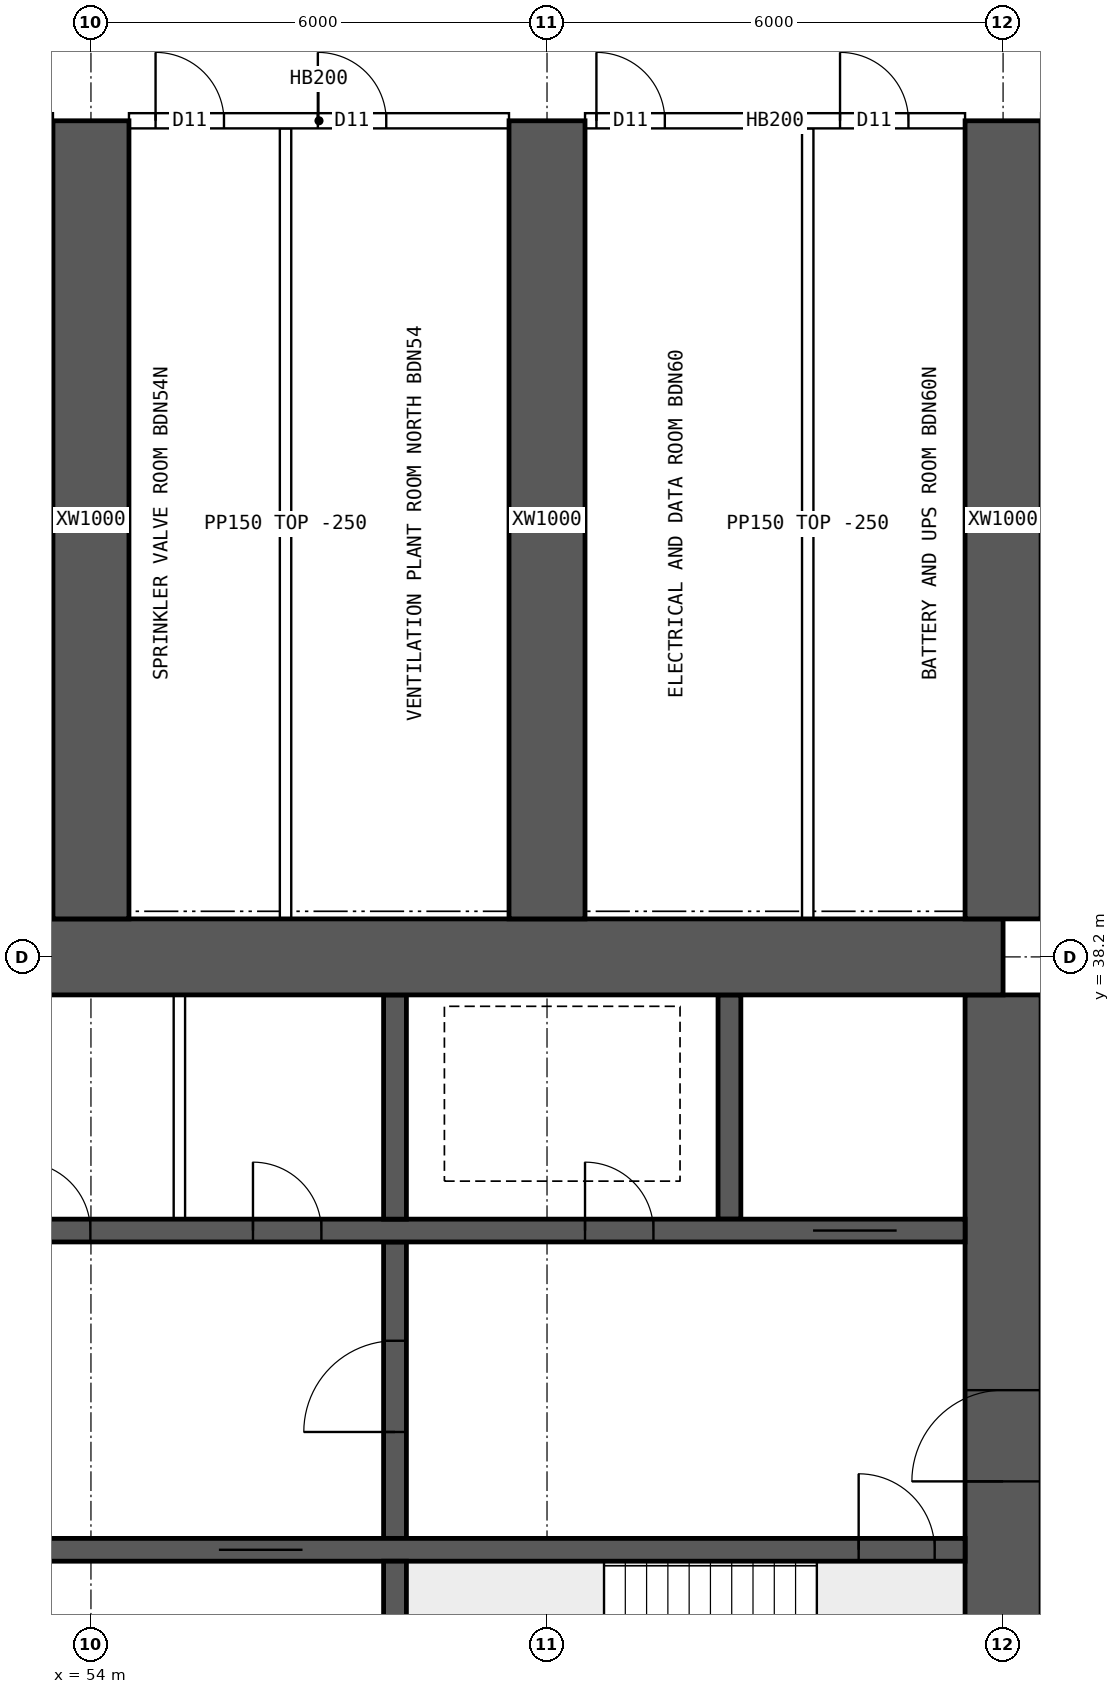
"""IFC4 building model, lengths in metres.
Left out: names, types, materials, properties, quantities, classifications, styles, units other than length and angle.
Written with IfcOpenShell. Run it as: python <this file> out.ifc"""

import sys

from ifc_helpers import new_model, si_unit, direction, frame, frame_2d, origin, place, context, subcontext, project, spatial, rectangle, extrude, element, fill, save


model = new_model("IFC4")
c1 = context("Model", 3, precision=1e-05, world=origin(), true_north=direction((0.0, 1.0)))
c2 = subcontext(c1, "Body", "Model", "MODEL_VIEW")
j1 = project(units=[si_unit("LENGTHUNIT", "METRE"), si_unit("PLANEANGLEUNIT", "RADIAN")], contexts=[c1])
p1 = place(None, origin())
s1 = spatial("IfcSite", under=j1, at=p1, CompositionType="ELEMENT")
p2 = place(p1, origin())
s2 = spatial("IfcBuilding", under=s1, at=p2, CompositionType="ELEMENT")
p3 = place(p2, frame((0.0, 0.0, 27.7)))
s3 = spatial("IfcBuildingStorey", under=s2, at=p3, CompositionType="ELEMENT", Elevation=27.7)
p4 = place(p3, frame((18.0, 38.2, 0.0), z_axis=(0.0, 0.0, 1.0), x_axis=(1.0, 0.0, 0.0)))
e1 = element("IfcWall", 1, at=p4, inside=s3, PredefinedType="SHEAR", context=c2, shape_type="SweptSolid", body=[
    extrude(rectangle(XDim=48.0, YDim=1.0, at=frame_2d((24.0, 0.0))), origin(), (0.0, 0.0, 1.0), 3.75),
])
p5 = place(p3, frame((66.0, 26.3, 0.0), z_axis=(0.0, 0.0, 1.0), x_axis=(0.0, 1.0, 0.0)))
e2 = element("IfcWall", 2, at=p5, inside=s3, PredefinedType="SHEAR", context=c2, shape_type="SweptSolid", body=[
    extrude(rectangle(XDim=11.4, YDim=1.0, at=frame_2d((5.7, 0.0))), origin(), (0.0, 0.0, 1.0), 3.75),
])
p6 = place(p5, frame((5.0, 0.0, 0.0)))
e3 = element("IfcOpeningElement", 3, at=p6, cuts=e2, PredefinedType="OPENING", context=c2, shape_type="SweptSolid", body=[
    extrude(rectangle(XDim=1.2, YDim=2.1, at=frame_2d((0.6, 1.05))), frame((0.0, 0.51, 0.0), z_axis=(0.0, -1.0, 0.0), x_axis=(1.0, 0.0, 0.0)), (0.0, 0.0, 1.0), 1.02),
])
p7 = place(p3, frame((18.5, 30.4, 0.0), z_axis=(0.0, 0.0, 1.0), x_axis=(1.0, 0.0, 0.0)))
e4 = element("IfcWall", 4, at=p7, inside=s3, PredefinedType="SHEAR", context=c2, shape_type="SweptSolid", body=[
    extrude(rectangle(XDim=47.0, YDim=0.3, at=frame_2d((23.5, 0.0))), origin(), (0.0, 0.0, 1.0), 3.75),
])
p8 = place(p7, frame((0.4, 0.0, 0.0)))
e5 = element("IfcOpeningElement", 5, at=p8, cuts=e4, PredefinedType="OPENING", context=c2, shape_type="SweptSolid", body=[
    extrude(rectangle(XDim=1.0, YDim=2.1, at=frame_2d((0.5, 1.05))), frame((0.0, 0.16, 0.0), z_axis=(0.0, -1.0, 0.0), x_axis=(1.0, 0.0, 0.0)), (0.0, 0.0, 1.0), 0.32),
])
p9 = place(p7, frame((45.6, 0.0, 0.0)))
e6 = element("IfcOpeningElement", 6, at=p9, cuts=e4, PredefinedType="OPENING", context=c2, shape_type="SweptSolid", body=[
    extrude(rectangle(XDim=1.0, YDim=2.1, at=frame_2d((0.5, 1.05))), frame((0.0, 0.16, 0.0), z_axis=(0.0, -1.0, 0.0), x_axis=(1.0, 0.0, 0.0)), (0.0, 0.0, 1.0), 0.32),
])
p10 = place(p7, frame((8.25, 0.0, 0.0)))
e7 = element("IfcOpeningElement", 7, at=p10, cuts=e4, PredefinedType="OPENING", context=c2, shape_type="SweptSolid", body=[
    extrude(rectangle(XDim=1.1, YDim=2.1, at=frame_2d((0.55, 1.05))), frame((0.0, 0.16, 0.0), z_axis=(0.0, -1.0, 0.0), x_axis=(1.0, 0.0, 0.0)), (0.0, 0.0, 1.0), 0.32),
])
p11 = place(p7, frame((10.85, 0.0, 0.0)))
e8 = element("IfcOpeningElement", 8, at=p11, cuts=e4, PredefinedType="OPENING", context=c2, shape_type="SweptSolid", body=[
    extrude(rectangle(XDim=1.1, YDim=2.1, at=frame_2d((0.55, 1.05))), frame((0.0, 0.16, 0.0), z_axis=(0.0, -1.0, 0.0), x_axis=(1.0, 0.0, 0.0)), (0.0, 0.0, 1.0), 0.32),
])
p12 = place(p7, frame((13.45, 0.0, 0.0)))
e9 = element("IfcOpeningElement", 9, at=p12, cuts=e4, PredefinedType="OPENING", context=c2, shape_type="SweptSolid", body=[
    extrude(rectangle(XDim=1.1, YDim=2.1, at=frame_2d((0.55, 1.05))), frame((0.0, 0.16, 0.0), z_axis=(0.0, -1.0, 0.0), x_axis=(1.0, 0.0, 0.0)), (0.0, 0.0, 1.0), 0.32),
])
p13 = place(p7, frame((16.05, 0.0, 0.0)))
e10 = element("IfcOpeningElement", 10, at=p13, cuts=e4, PredefinedType="OPENING", context=c2, shape_type="SweptSolid", body=[
    extrude(rectangle(XDim=1.1, YDim=2.1, at=frame_2d((0.55, 1.05))), frame((0.0, 0.16, 0.0), z_axis=(0.0, -1.0, 0.0), x_axis=(1.0, 0.0, 0.0)), (0.0, 0.0, 1.0), 0.32),
])
p14 = place(p7, frame((30.117, 0.0, 0.0)))
e11 = element("IfcOpeningElement", 11, at=p14, cuts=e4, PredefinedType="OPENING", context=c2, shape_type="SweptSolid", body=[
    extrude(rectangle(XDim=1.1, YDim=2.1, at=frame_2d((0.55, 1.05))), frame((0.0, 0.16, 0.0), z_axis=(0.0, -1.0, 0.0), x_axis=(1.0, 0.0, 0.0)), (0.0, 0.0, 1.0), 0.32),
])
p15 = place(p7, frame((33.65, 0.0, 0.0)))
e12 = element("IfcOpeningElement", 12, at=p15, cuts=e4, PredefinedType="OPENING", context=c2, shape_type="SweptSolid", body=[
    extrude(rectangle(XDim=1.1, YDim=2.1, at=frame_2d((0.55, 1.05))), frame((0.0, 0.16, 0.0), z_axis=(0.0, -1.0, 0.0), x_axis=(1.0, 0.0, 0.0)), (0.0, 0.0, 1.0), 0.32),
])
p16 = place(p7, frame((37.183, 0.0, 0.0)))
e13 = element("IfcOpeningElement", 13, at=p16, cuts=e4, PredefinedType="OPENING", context=c2, shape_type="SweptSolid", body=[
    extrude(rectangle(XDim=1.1, YDim=2.1, at=frame_2d((0.55, 1.05))), frame((0.0, 0.16, 0.0), z_axis=(0.0, -1.0, 0.0), x_axis=(1.0, 0.0, 0.0)), (0.0, 0.0, 1.0), 0.32),
])
p17 = place(p3, frame((18.5, 34.6, 0.0), z_axis=(0.0, 0.0, 1.0), x_axis=(1.0, 0.0, 0.0)))
e14 = element("IfcWall", 14, at=p17, inside=s3, PredefinedType="SHEAR", context=c2, shape_type="SweptSolid", body=[
    extrude(rectangle(XDim=47.0, YDim=0.3, at=frame_2d((23.5, 0.0))), origin(), (0.0, 0.0, 1.0), 3.75),
])
p18 = place(p17, frame((0.9, 0.0, 0.0)))
e15 = element("IfcOpeningElement", 15, at=p18, cuts=e14, PredefinedType="OPENING", context=c2, shape_type="SweptSolid", body=[
    extrude(rectangle(XDim=1.1, YDim=2.1, at=frame_2d((0.55, 1.05))), frame((0.0, 0.16, 0.0), z_axis=(0.0, -1.0, 0.0), x_axis=(1.0, 0.0, 0.0)), (0.0, 0.0, 1.0), 0.32),
])
p19 = place(p17, frame((45.0, 0.0, 0.0)))
e16 = element("IfcOpeningElement", 16, at=p19, cuts=e14, PredefinedType="OPENING", context=c2, shape_type="SweptSolid", body=[
    extrude(rectangle(XDim=1.1, YDim=2.1, at=frame_2d((0.55, 1.05))), frame((0.0, 0.16, 0.0), z_axis=(0.0, -1.0, 0.0), x_axis=(1.0, 0.0, 0.0)), (0.0, 0.0, 1.0), 0.32),
])
p20 = place(p17, frame((4.1, 0.0, 0.0)))
e17 = element("IfcOpeningElement", 17, at=p20, cuts=e14, PredefinedType="OPENING", context=c2, shape_type="SweptSolid", body=[
    extrude(rectangle(XDim=0.9, YDim=2.1, at=frame_2d((0.45, 1.05))), frame((0.0, 0.16, 0.0), z_axis=(0.0, -1.0, 0.0), x_axis=(1.0, 0.0, 0.0)), (0.0, 0.0, 1.0), 0.32),
])
p21 = place(p17, frame((42.0, 0.0, 0.0)))
e18 = element("IfcOpeningElement", 18, at=p21, cuts=e14, PredefinedType="OPENING", context=c2, shape_type="SweptSolid", body=[
    extrude(rectangle(XDim=0.9, YDim=2.1, at=frame_2d((0.45, 1.05))), frame((0.0, 0.16, 0.0), z_axis=(0.0, -1.0, 0.0), x_axis=(1.0, 0.0, 0.0)), (0.0, 0.0, 1.0), 0.32),
])
p22 = place(p17, frame((8.875, 0.0, 0.0)))
e19 = element("IfcOpeningElement", 19, at=p22, cuts=e14, PredefinedType="OPENING", context=c2, shape_type="SweptSolid", body=[
    extrude(rectangle(XDim=0.9, YDim=2.1, at=frame_2d((0.45, 1.05))), frame((0.0, 0.16, 0.0), z_axis=(0.0, -1.0, 0.0), x_axis=(1.0, 0.0, 0.0)), (0.0, 0.0, 1.0), 0.32),
])
p23 = place(p17, frame((12.849, 0.0, 0.0)))
e20 = element("IfcOpeningElement", 20, at=p23, cuts=e14, PredefinedType="OPENING", context=c2, shape_type="SweptSolid", body=[
    extrude(rectangle(XDim=0.9, YDim=2.1, at=frame_2d((0.45, 1.05))), frame((0.0, 0.16, 0.0), z_axis=(0.0, -1.0, 0.0), x_axis=(1.0, 0.0, 0.0)), (0.0, 0.0, 1.0), 0.32),
])
p24 = place(p17, frame((16.496, 0.0, 0.0)))
e21 = element("IfcOpeningElement", 21, at=p24, cuts=e14, PredefinedType="OPENING", context=c2, shape_type="SweptSolid", body=[
    extrude(rectangle(XDim=0.9, YDim=2.1, at=frame_2d((0.45, 1.05))), frame((0.0, 0.16, 0.0), z_axis=(0.0, -1.0, 0.0), x_axis=(1.0, 0.0, 0.0)), (0.0, 0.0, 1.0), 0.32),
])
p25 = place(p17, frame((20.255, 0.0, 0.0)))
e22 = element("IfcOpeningElement", 22, at=p25, cuts=e14, PredefinedType="OPENING", context=c2, shape_type="SweptSolid", body=[
    extrude(rectangle(XDim=0.9, YDim=2.1, at=frame_2d((0.45, 1.05))), frame((0.0, 0.16, 0.0), z_axis=(0.0, -1.0, 0.0), x_axis=(1.0, 0.0, 0.0)), (0.0, 0.0, 1.0), 0.32),
])
p26 = place(p17, frame((24.661, 0.0, 0.0)))
e23 = element("IfcOpeningElement", 23, at=p26, cuts=e14, PredefinedType="OPENING", context=c2, shape_type="SweptSolid", body=[
    extrude(rectangle(XDim=0.9, YDim=2.1, at=frame_2d((0.45, 1.05))), frame((0.0, 0.16, 0.0), z_axis=(0.0, -1.0, 0.0), x_axis=(1.0, 0.0, 0.0)), (0.0, 0.0, 1.0), 0.32),
])
p27 = place(p17, frame((27.458, 0.0, 0.0)))
e24 = element("IfcOpeningElement", 24, at=p27, cuts=e14, PredefinedType="OPENING", context=c2, shape_type="SweptSolid", body=[
    extrude(rectangle(XDim=0.9, YDim=2.1, at=frame_2d((0.45, 1.05))), frame((0.0, 0.16, 0.0), z_axis=(0.0, -1.0, 0.0), x_axis=(1.0, 0.0, 0.0)), (0.0, 0.0, 1.0), 0.32),
])
p28 = place(p17, frame((29.425, 0.0, 0.0)))
e25 = element("IfcOpeningElement", 25, at=p28, cuts=e14, PredefinedType="OPENING", context=c2, shape_type="SweptSolid", body=[
    extrude(rectangle(XDim=0.9, YDim=2.1, at=frame_2d((0.45, 1.05))), frame((0.0, 0.16, 0.0), z_axis=(0.0, -1.0, 0.0), x_axis=(1.0, 0.0, 0.0)), (0.0, 0.0, 1.0), 0.32),
])
p29 = place(p17, frame((31.857, 0.0, 0.0)))
e26 = element("IfcOpeningElement", 26, at=p29, cuts=e14, PredefinedType="OPENING", context=c2, shape_type="SweptSolid", body=[
    extrude(rectangle(XDim=0.9, YDim=2.1, at=frame_2d((0.45, 1.05))), frame((0.0, 0.16, 0.0), z_axis=(0.0, -1.0, 0.0), x_axis=(1.0, 0.0, 0.0)), (0.0, 0.0, 1.0), 0.32),
])
p30 = place(p17, frame((34.592, 0.0, 0.0)))
e27 = element("IfcOpeningElement", 27, at=p30, cuts=e14, PredefinedType="OPENING", context=c2, shape_type="SweptSolid", body=[
    extrude(rectangle(XDim=0.9, YDim=2.1, at=frame_2d((0.45, 1.05))), frame((0.0, 0.16, 0.0), z_axis=(0.0, -1.0, 0.0), x_axis=(1.0, 0.0, 0.0)), (0.0, 0.0, 1.0), 0.32),
])
p31 = place(p17, frame((37.632, 0.0, 0.0)))
e28 = element("IfcOpeningElement", 28, at=p31, cuts=e14, PredefinedType="OPENING", context=c2, shape_type="SweptSolid", body=[
    extrude(rectangle(XDim=0.9, YDim=2.1, at=frame_2d((0.45, 1.05))), frame((0.0, 0.16, 0.0), z_axis=(0.0, -1.0, 0.0), x_axis=(1.0, 0.0, 0.0)), (0.0, 0.0, 1.0), 0.32),
])
p32 = place(p3, frame((58.0, 26.3, 0.0), z_axis=(0.0, 0.0, 1.0), x_axis=(0.0, 1.0, 0.0)))
e29 = element("IfcWall", 29, at=p32, inside=s3, PredefinedType="SHEAR", context=c2, shape_type="SweptSolid", body=[
    extrude(rectangle(XDim=3.95, YDim=0.3, at=frame_2d((1.975, 0.0))), origin(), (0.0, 0.0, 1.0), 3.75),
])
p33 = place(p3, frame((58.0, 30.55, 0.0), z_axis=(0.0, 0.0, 1.0), x_axis=(0.0, 1.0, 0.0)))
e30 = element("IfcWall", 30, at=p33, inside=s3, PredefinedType="SHEAR", context=c2, shape_type="SweptSolid", body=[
    extrude(rectangle(XDim=3.9, YDim=0.3, at=frame_2d((1.95, 0.0))), origin(), (0.0, 0.0, 1.0), 3.75),
])
p34 = place(p33, frame((1.4, 0.0, 0.0)))
e31 = element("IfcOpeningElement", 31, at=p34, cuts=e30, PredefinedType="OPENING", context=c2, shape_type="SweptSolid", body=[
    extrude(rectangle(XDim=1.2, YDim=2.1, at=frame_2d((0.6, 1.05))), frame((0.0, 0.16, 0.0), z_axis=(0.0, -1.0, 0.0), x_axis=(1.0, 0.0, 0.0)), (0.0, 0.0, 1.0), 0.32),
])
for number, where, z_axis, x_axis in (
    (32, (62.4, 34.75, 0.0), (0.0, 0.0, 1.0), (0.0, 1.0, 0.0)),
    (33, (58.0, 34.75, 0.0), (0.0, 0.0, 1.0), (0.0, 1.0, 0.0)),
):
    element("IfcWall", number, at=place(p3, frame(where, z_axis=z_axis, x_axis=x_axis)), inside=s3, PredefinedType="SHEAR", context=c2, shape_type="SweptSolid", body=[
        extrude(rectangle(XDim=2.95, YDim=0.3, at=frame_2d((1.475, 0.0))), origin(), (0.0, 0.0, 1.0), 3.75),
    ])
for number, where, z_axis, x_axis in (
    (34, (54.0, 38.7, 0.0), (0.0, 0.0, 1.0), (0.0, 1.0, 0.0)),
    (35, (60.0, 38.7, 0.0), (0.0, 0.0, 1.0), (0.0, 1.0, 0.0)),
    (36, (66.0, 38.7, 0.0), (0.0, 0.0, 1.0), (0.0, 1.0, 0.0)),
):
    element("IfcWall", number, at=place(p3, frame(where, z_axis=z_axis, x_axis=x_axis)), inside=s3, PredefinedType="SHEAR", context=c2, shape_type="SweptSolid", body=[
        extrude(rectangle(XDim=10.5, YDim=1.0, at=frame_2d((5.25, 0.0))), origin(), (0.0, 0.0, 1.0), 3.75),
    ])
p35 = place(p3, frame((55.163, 34.75, 0.0), z_axis=(0.0, 0.0, 1.0), x_axis=(0.0, 1.0, 0.0)))
e37 = element("IfcWall", 37, at=p35, inside=s3, PredefinedType="SOLIDWALL", context=c2, shape_type="SweptSolid", body=[
    extrude(rectangle(XDim=2.95, YDim=0.15, at=frame_2d((1.475, 0.0))), origin(), (0.0, 0.0, 1.0), 3.5),
])
p36 = place(p3, frame((54.5, 49.2, 0.0), z_axis=(0.0, 0.0, 1.0), x_axis=(1.0, 0.0, 0.0)))
e38 = element("IfcWall", 38, at=p36, inside=s3, PredefinedType="SOLIDWALL", context=c2, shape_type="SweptSolid", body=[
    extrude(rectangle(XDim=5.0, YDim=0.2, at=frame_2d((2.5, 0.0))), origin(), (0.0, 0.0, 1.0), 3.5),
])
p37 = place(p36, frame((0.35, 0.0, 0.0)))
e39 = element("IfcOpeningElement", 39, at=p37, cuts=e38, PredefinedType="OPENING", context=c2, shape_type="SweptSolid", body=[
    extrude(rectangle(XDim=0.9, YDim=2.1, at=frame_2d((0.45, 1.05))), frame((0.0, 0.11, 0.0), z_axis=(0.0, -1.0, 0.0), x_axis=(1.0, 0.0, 0.0)), (0.0, 0.0, 1.0), 0.22),
])
p38 = place(p36, frame((2.485, 0.0, 0.0)))
e40 = element("IfcOpeningElement", 40, at=p38, cuts=e38, PredefinedType="OPENING", context=c2, shape_type="SweptSolid", body=[
    extrude(rectangle(XDim=0.9, YDim=2.1, at=frame_2d((0.45, 1.05))), frame((0.0, 0.11, 0.0), z_axis=(0.0, -1.0, 0.0), x_axis=(1.0, 0.0, 0.0)), (0.0, 0.0, 1.0), 0.22),
])
p39 = place(p3, frame((60.5, 49.2, 0.0), z_axis=(0.0, 0.0, 1.0), x_axis=(1.0, 0.0, 0.0)))
e41 = element("IfcWall", 41, at=p39, inside=s3, PredefinedType="SOLIDWALL", context=c2, shape_type="SweptSolid", body=[
    extrude(rectangle(XDim=5.0, YDim=0.2, at=frame_2d((2.5, 0.0))), origin(), (0.0, 0.0, 1.0), 3.5),
])
p40 = place(p39, frame((0.15, 0.0, 0.0)))
e42 = element("IfcOpeningElement", 42, at=p40, cuts=e41, PredefinedType="OPENING", context=c2, shape_type="SweptSolid", body=[
    extrude(rectangle(XDim=0.9, YDim=2.1, at=frame_2d((0.45, 1.05))), frame((0.0, 0.11, 0.0), z_axis=(0.0, -1.0, 0.0), x_axis=(1.0, 0.0, 0.0)), (0.0, 0.0, 1.0), 0.22),
])
p41 = place(p39, frame((3.355, 0.0, 0.0)))
e43 = element("IfcOpeningElement", 43, at=p41, cuts=e41, PredefinedType="OPENING", context=c2, shape_type="SweptSolid", body=[
    extrude(rectangle(XDim=0.9, YDim=2.1, at=frame_2d((0.45, 1.05))), frame((0.0, 0.11, 0.0), z_axis=(0.0, -1.0, 0.0), x_axis=(1.0, 0.0, 0.0)), (0.0, 0.0, 1.0), 0.22),
])
for number, where, z_axis, x_axis in (
    (44, (56.56, 38.7, 0.0), (0.0, 0.0, 1.0), (0.0, 1.0, 0.0)),
    (45, (63.43, 38.7, 0.0), (0.0, 0.0, 1.0), (0.0, 1.0, 0.0)),
):
    element("IfcWall", number, at=place(p3, frame(where, z_axis=z_axis, x_axis=x_axis)), inside=s3, PredefinedType="PARTITIONING", context=c2, shape_type="SweptSolid", body=[
        extrude(rectangle(XDim=10.4, YDim=0.15, at=frame_2d((5.2, 0.0))), origin(), (0.0, 0.0, 1.0), 3.5),
    ])
p42 = place(p6, origin())
e46 = element("IfcDoor", 46, at=p42, inside=s3, OperationType="SINGLE_SWING_LEFT", PredefinedType="DOOR", context=c2, shape_type="SweptSolid", body=[
    extrude(rectangle(XDim=1.2, YDim=2.1, at=frame_2d((0.6, 1.05))), frame((0.0, 0.025, 0.0), z_axis=(0.0, -1.0, 0.0), x_axis=(1.0, 0.0, 0.0)), (0.0, 0.0, 1.0), 0.05),
])
fill(e3, e46)
p43 = place(p9, origin())
e47 = element("IfcDoor", 47, at=p43, inside=s3, OperationType="SINGLE_SWING_LEFT", PredefinedType="DOOR", context=c2, shape_type="SweptSolid", body=[
    extrude(rectangle(XDim=1.0, YDim=2.1, at=frame_2d((0.5, 1.05))), frame((0.0, 0.025, 0.0), z_axis=(0.0, -1.0, 0.0), x_axis=(1.0, 0.0, 0.0)), (0.0, 0.0, 1.0), 0.05),
])
fill(e6, e47)
p44 = place(p19, origin())
e48 = element("IfcDoor", 48, at=p44, inside=s3, OperationType="DOUBLE_DOOR_SLIDING", PredefinedType="DOOR", context=c2, shape_type="SweptSolid", body=[
    extrude(rectangle(XDim=1.1, YDim=2.1, at=frame_2d((0.55, 1.05))), frame((0.0, 0.025, 0.0), z_axis=(0.0, -1.0, 0.0), x_axis=(1.0, 0.0, 0.0)), (0.0, 0.0, 1.0), 0.05),
])
fill(e16, e48)
p45 = place(p21, origin())
e49 = element("IfcDoor", 49, at=p45, inside=s3, OperationType="SINGLE_SWING_LEFT", PredefinedType="DOOR", context=c2, shape_type="SweptSolid", body=[
    extrude(rectangle(XDim=0.9, YDim=2.1, at=frame_2d((0.45, 1.05))), frame((0.0, 0.025, 0.0), z_axis=(0.0, -1.0, 0.0), x_axis=(1.0, 0.0, 0.0)), (0.0, 0.0, 1.0), 0.05),
])
fill(e18, e49)
p46 = place(p34, origin())
e50 = element("IfcDoor", 50, at=p46, inside=s3, OperationType="SINGLE_SWING_LEFT", PredefinedType="DOOR", context=c2, shape_type="SweptSolid", body=[
    extrude(rectangle(XDim=1.2, YDim=2.1, at=frame_2d((0.6, 1.05))), frame((0.0, 0.025, 0.0), z_axis=(0.0, -1.0, 0.0), x_axis=(1.0, 0.0, 0.0)), (0.0, 0.0, 1.0), 0.05),
])
fill(e31, e50)
p47 = place(p30, origin())
e51 = element("IfcDoor", 51, at=p47, inside=s3, OperationType="SINGLE_SWING_LEFT", PredefinedType="DOOR", context=c2, shape_type="SweptSolid", body=[
    extrude(rectangle(XDim=0.9, YDim=2.1, at=frame_2d((0.45, 1.05))), frame((0.0, 0.025, 0.0), z_axis=(0.0, -1.0, 0.0), x_axis=(1.0, 0.0, 0.0)), (0.0, 0.0, 1.0), 0.05),
])
fill(e27, e51)
p48 = place(p31, origin())
e52 = element("IfcDoor", 52, at=p48, inside=s3, OperationType="SINGLE_SWING_LEFT", PredefinedType="DOOR", context=c2, shape_type="SweptSolid", body=[
    extrude(rectangle(XDim=0.9, YDim=2.1, at=frame_2d((0.45, 1.05))), frame((0.0, 0.025, 0.0), z_axis=(0.0, -1.0, 0.0), x_axis=(1.0, 0.0, 0.0)), (0.0, 0.0, 1.0), 0.05),
])
fill(e28, e52)
p49 = place(p16, origin())
e53 = element("IfcDoor", 53, at=p49, inside=s3, OperationType="DOUBLE_DOOR_SLIDING", PredefinedType="DOOR", context=c2, shape_type="SweptSolid", body=[
    extrude(rectangle(XDim=1.1, YDim=2.1, at=frame_2d((0.55, 1.05))), frame((0.0, 0.025, 0.0), z_axis=(0.0, -1.0, 0.0), x_axis=(1.0, 0.0, 0.0)), (0.0, 0.0, 1.0), 0.05),
])
fill(e13, e53)
p50 = place(p37, origin())
e54 = element("IfcDoor", 54, at=p50, inside=s3, OperationType="SINGLE_SWING_LEFT", PredefinedType="DOOR", context=c2, shape_type="SweptSolid", body=[
    extrude(rectangle(XDim=0.9, YDim=2.1, at=frame_2d((0.45, 1.05))), frame((0.0, 0.025, 0.0), z_axis=(0.0, -1.0, 0.0), x_axis=(1.0, 0.0, 0.0)), (0.0, 0.0, 1.0), 0.05),
])
fill(e39, e54)
p51 = place(p38, origin())
e55 = element("IfcDoor", 55, at=p51, inside=s3, OperationType="SINGLE_SWING_LEFT", PredefinedType="DOOR", context=c2, shape_type="SweptSolid", body=[
    extrude(rectangle(XDim=0.9, YDim=2.1, at=frame_2d((0.45, 1.05))), frame((0.0, 0.025, 0.0), z_axis=(0.0, -1.0, 0.0), x_axis=(1.0, 0.0, 0.0)), (0.0, 0.0, 1.0), 0.05),
])
fill(e40, e55)
p52 = place(p40, origin())
e56 = element("IfcDoor", 56, at=p52, inside=s3, OperationType="SINGLE_SWING_LEFT", PredefinedType="DOOR", context=c2, shape_type="SweptSolid", body=[
    extrude(rectangle(XDim=0.9, YDim=2.1, at=frame_2d((0.45, 1.05))), frame((0.0, 0.025, 0.0), z_axis=(0.0, -1.0, 0.0), x_axis=(1.0, 0.0, 0.0)), (0.0, 0.0, 1.0), 0.05),
])
fill(e42, e56)
p53 = place(p41, origin())
e57 = element("IfcDoor", 57, at=p53, inside=s3, OperationType="SINGLE_SWING_LEFT", PredefinedType="DOOR", context=c2, shape_type="SweptSolid", body=[
    extrude(rectangle(XDim=0.9, YDim=2.1, at=frame_2d((0.45, 1.05))), frame((0.0, 0.025, 0.0), z_axis=(0.0, -1.0, 0.0), x_axis=(1.0, 0.0, 0.0)), (0.0, 0.0, 1.0), 0.05),
])
fill(e43, e57)
save(model, sys.argv[1])
